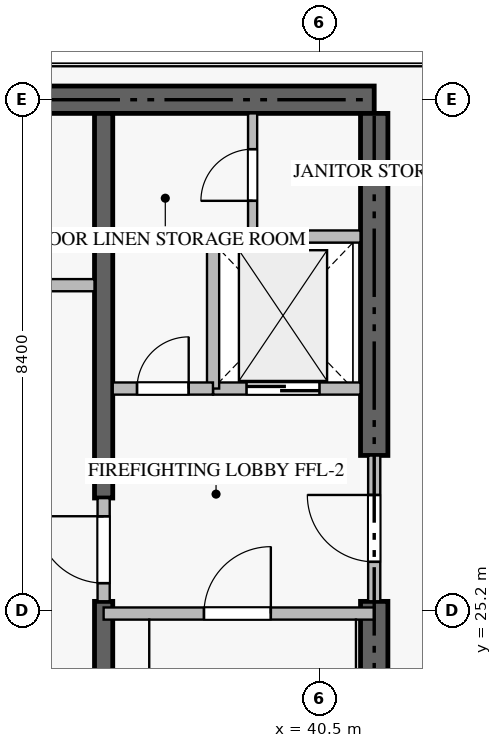
"""IFC4 building model, lengths in metres.
Left out: names, types, materials, properties, quantities, classifications, styles, units other than length and angle.
Written with IfcOpenShell. Run it as: python <this file> out.ifc"""

import sys

from ifc_helpers import new_model, si_unit, direction, frame, frame_2d, origin, place, context, subcontext, project, spatial, rectangle, extrude, source, transform, mapped, element, fill, save


model = new_model("IFC4")
c1 = context("Model", 3, precision=1e-05, world=origin(), true_north=direction((0.0, 1.0)))
c2 = subcontext(c1, "Body", "Model", "MODEL_VIEW")
j1 = project(units=[si_unit("LENGTHUNIT", "METRE"), si_unit("PLANEANGLEUNIT", "RADIAN")], contexts=[c1])
p1 = place(None, origin())
s1 = spatial("IfcSite", under=j1, at=p1, CompositionType="ELEMENT")
p2 = place(p1, origin())
s2 = spatial("IfcBuilding", under=s1, at=p2, CompositionType="ELEMENT")
p3 = place(p2, frame((0.0, 0.0, -3.6)))
s3 = spatial("IfcBuildingStorey", under=s2, at=p3, CompositionType="ELEMENT", Elevation=-3.6)
p4 = place(p3, frame((41.4, 33.6, -0.36), z_axis=(0.0, 0.0, 1.0), x_axis=(-1.0, 0.0, 0.0)))
e1 = element("IfcWall", 1, at=p4, inside=s3, PredefinedType="SHEAR", context=c2, shape_type="SweptSolid", body=[
    extrude(rectangle(XDim=18.0, YDim=0.45, at=frame_2d((9.0, 0.0))), origin(), (0.0, 0.0, 1.0), 3.578),
])
p5 = place(p3, frame((41.4, 17.025, -0.36), z_axis=(0.0, 0.0, 1.0), x_axis=(0.0, 1.0, 0.0)))
e2 = element("IfcWall", 2, at=p5, inside=s3, PredefinedType="SHEAR", context=c2, shape_type="SweptSolid", body=[
    extrude(rectangle(XDim=8.325, YDim=0.45, at=frame_2d((4.163, 0.0))), origin(), (0.0, 0.0, 1.0), 3.578),
])
p6 = place(p3, frame((41.4, 27.75, -0.36), z_axis=(0.0, 0.0, 1.0), x_axis=(0.0, 1.0, 0.0)))
e3 = element("IfcWall", 3, at=p6, inside=s3, PredefinedType="SHEAR", context=c2, shape_type="SweptSolid", body=[
    extrude(rectangle(XDim=5.625, YDim=0.45, at=frame_2d((2.812, 0.0))), origin(), (0.0, 0.0, 1.0), 3.578),
])
p7 = place(p3, frame((36.95, 17.025, -0.36), z_axis=(0.0, 0.0, 1.0), x_axis=(0.0, 1.0, 0.0)))
e4 = element("IfcWall", 4, at=p7, inside=s3, PredefinedType="SHEAR", context=c2, shape_type="SweptSolid", body=[
    extrude(rectangle(XDim=8.325, YDim=0.3, at=frame_2d((4.163, 0.0))), origin(), (0.0, 0.0, 1.0), 3.578),
])
p8 = place(p3, frame((36.95, 27.05, -0.36), z_axis=(0.0, 0.0, 1.0), x_axis=(0.0, 1.0, 0.0)))
e5 = element("IfcWall", 5, at=p8, inside=s3, PredefinedType="SHEAR", context=c2, shape_type="SweptSolid", body=[
    extrude(rectangle(XDim=6.325, YDim=0.3, at=frame_2d((3.163, 0.0))), origin(), (0.0, 0.0, 1.0), 3.578),
])
p9 = place(p3, frame((36.95, 25.15, 0.0), z_axis=(0.0, 0.0, 1.0), x_axis=(1.0, 0.0, 0.0)))
e6 = element("IfcWall", 6, at=p9, inside=s3, PredefinedType="STANDARD", context=c2, shape_type="SweptSolid", body=[
    extrude(rectangle(XDim=4.45, YDim=0.2, at=frame_2d((2.225, 0.0))), origin(), (0.0, 0.0, 1.0), 3.22),
])
p10 = place(p9, frame((1.65, 0.0, 0.0)))
e7 = element("IfcOpeningElement", 7, at=p10, cuts=e6, PredefinedType="OPENING", context=c2, shape_type="SweptSolid", body=[
    extrude(rectangle(XDim=1.1, YDim=2.15, at=frame_2d((0.55, 1.075))), frame((0.0, 0.11, 0.0), z_axis=(0.0, -1.0, 0.0), x_axis=(1.0, 0.0, 0.0)), (0.0, 0.0, 1.0), 0.22),
])
p11 = place(p3, frame((38.75, 28.85, 0.0), z_axis=(0.0, 0.0, 1.0), x_axis=(1.0, 0.0, 0.0)))
e8 = element("IfcWall", 8, at=p11, inside=s3, PredefinedType="STANDARD", context=c2, shape_type="SweptSolid", body=[
    extrude(rectangle(XDim=2.425, YDim=0.2, at=frame_2d((1.212, 0.0))), origin(), (0.0, 0.0, 1.0), 3.22),
])
p12 = place(p11, frame((0.55, 0.0, 0.0)))
e9 = element("IfcOpeningElement", 9, at=p12, cuts=e8, PredefinedType="OPENING", context=c2, shape_type="SweptSolid", body=[
    extrude(rectangle(XDim=1.2, YDim=2.2, at=frame_2d((0.6, 1.1))), frame((0.0, 0.11, 0.0), z_axis=(0.0, -1.0, 0.0), x_axis=(1.0, 0.0, 0.0)), (0.0, 0.0, 1.0), 0.22),
])
p13 = place(p3, frame((38.75, 28.85, 0.0), z_axis=(0.0, 0.0, 1.0), x_axis=(0.0, 1.0, 0.0)))
e10 = element("IfcWall", 10, at=p13, inside=s3, PredefinedType="STANDARD", context=c2, shape_type="SweptSolid", body=[
    extrude(rectangle(XDim=2.5, YDim=0.2, at=frame_2d((1.25, 0.0))), origin(), (0.0, 0.0, 1.0), 3.22),
])
p14 = place(p3, frame((38.75, 31.35, 0.0), z_axis=(0.0, 0.0, 1.0), x_axis=(1.0, 0.0, 0.0)))
e11 = element("IfcWall", 11, at=p14, inside=s3, PredefinedType="STANDARD", context=c2, shape_type="SweptSolid", body=[
    extrude(rectangle(XDim=2.425, YDim=0.2, at=frame_2d((1.212, 0.0))), origin(), (0.0, 0.0, 1.0), 3.22),
])
p15 = place(p3, frame((37.1, 28.85, 0.0), z_axis=(0.0, 0.0, 1.0), x_axis=(1.0, 0.0, 0.0)))
e12 = element("IfcWall", 12, at=p15, inside=s3, PredefinedType="STANDARD", context=c2, shape_type="SweptSolid", body=[
    extrude(rectangle(XDim=1.648, YDim=0.2, at=frame_2d((0.824, 0.0))), origin(), (0.0, 0.0, 1.0), 3.22),
])
p16 = place(p15, frame((0.399, 0.0, 0.0)))
e13 = element("IfcOpeningElement", 13, at=p16, cuts=e12, PredefinedType="OPENING", context=c2, shape_type="SweptSolid", body=[
    extrude(rectangle(XDim=0.85, YDim=2.1, at=frame_2d((0.425, 1.05))), frame((0.0, 0.11, 0.0), z_axis=(0.0, -1.0, 0.0), x_axis=(1.0, 0.0, 0.0)), (0.0, 0.0, 1.0), 0.22),
])
p17 = place(p3, frame((41.4, 25.352, 0.0), z_axis=(0.0, 0.0, 1.0), x_axis=(0.0, 1.0, 0.0)))
e14 = element("IfcWall", 14, at=p17, inside=s3, PredefinedType="STANDARD", context=c2, shape_type="SweptSolid", body=[
    extrude(rectangle(XDim=2.396, YDim=0.2, at=frame_2d((1.198, 0.0))), origin(), (0.0, 0.0, 1.0), 3.22),
])
p18 = place(p17, frame((0.648, 0.0, 0.0)))
e15 = element("IfcOpeningElement", 15, at=p18, cuts=e14, PredefinedType="OPENING", context=c2, shape_type="SweptSolid", body=[
    extrude(rectangle(XDim=1.1, YDim=2.15, at=frame_2d((0.55, 1.075))), frame((0.0, 0.11, 0.0), z_axis=(0.0, -1.0, 0.0), x_axis=(1.0, 0.0, 0.0)), (0.0, 0.0, 1.0), 0.22),
])
p19 = place(p3, frame((36.95, 25.352, 0.0), z_axis=(0.0, 0.0, 1.0), x_axis=(0.0, 1.0, 0.0)))
e16 = element("IfcWall", 16, at=p19, inside=s3, PredefinedType="STANDARD", context=c2, shape_type="SweptSolid", body=[
    extrude(rectangle(XDim=1.696, YDim=0.2, at=frame_2d((0.848, 0.0))), origin(), (0.0, 0.0, 1.0), 3.22),
])
p20 = place(p19, frame((0.298, 0.0, 0.0)))
e17 = element("IfcOpeningElement", 17, at=p20, cuts=e16, PredefinedType="OPENING", context=c2, shape_type="SweptSolid", body=[
    extrude(rectangle(XDim=1.1, YDim=2.15, at=frame_2d((0.55, 1.075))), frame((0.0, 0.11, 0.0), z_axis=(0.0, -1.0, 0.0), x_axis=(1.0, 0.0, 0.0)), (0.0, 0.0, 1.0), 0.22),
])
p21 = place(p3, frame((28.0, 30.55, 0.0), z_axis=(0.0, 0.0, 1.0), x_axis=(1.0, 0.0, 0.0)))
e18 = element("IfcWall", 18, at=p21, inside=s3, PredefinedType="STANDARD", context=c2, shape_type="SweptSolid", body=[
    extrude(rectangle(XDim=8.8, YDim=0.2, at=frame_2d((4.4, 0.0))), origin(), (0.0, 0.0, 1.0), 3.22),
])
p22 = place(p3, frame((39.4, 31.35, 0.0), z_axis=(0.0, 0.0, 1.0), x_axis=(0.0, 1.0, 0.0)))
e19 = element("IfcWall", 19, at=p22, inside=s3, PredefinedType="PARTITIONING", context=c2, shape_type="SweptSolid", body=[
    extrude(rectangle(XDim=2.025, YDim=0.15, at=frame_2d((1.012, 0.0))), origin(), (0.0, 0.0, 1.0), 3.22),
])
p23 = place(p22, frame((0.587, 0.0, 0.0)))
e20 = element("IfcOpeningElement", 20, at=p23, cuts=e19, PredefinedType="OPENING", context=c2, shape_type="SweptSolid", body=[
    extrude(rectangle(XDim=0.85, YDim=2.1, at=frame_2d((0.425, 1.05))), frame((0.0, 0.085, 0.0), z_axis=(0.0, -1.0, 0.0), x_axis=(1.0, 0.0, 0.0)), (0.0, 0.0, 1.0), 0.17),
])
m1 = source(origin(), c2, "Body", "SweptSolid", [
    extrude(rectangle(XDim=1.1, YDim=2.15, at=frame_2d((0.55, 1.075))), frame((0.0, 0.025, 0.0), z_axis=(0.0, -1.0, 0.0), x_axis=(1.0, 0.0, 0.0)), (0.0, 0.0, 1.0), 0.05),
])
p24 = place(p10, origin())
e21 = element("IfcDoor", 21, at=p24, inside=s3, OperationType="SINGLE_SWING_RIGHT", PredefinedType="DOOR", context=c2, shape_type="MappedRepresentation", body=[
    mapped(m1, transform((0.0, 0.0, 0.0), scale=1.0)),
])
fill(e7, e21)
m2 = source(origin(), c2, "Body", "SweptSolid", [
    extrude(rectangle(XDim=1.2, YDim=2.2, at=frame_2d((0.6, 1.1))), frame((0.0, 0.025, 0.0), z_axis=(0.0, -1.0, 0.0), x_axis=(1.0, 0.0, 0.0)), (0.0, 0.0, 1.0), 0.05),
])
p25 = place(p12, origin())
e22 = element("IfcDoor", 22, at=p25, inside=s3, OperationType="DOUBLE_DOOR_SLIDING", PredefinedType="DOOR", context=c2, shape_type="MappedRepresentation", body=[
    mapped(m2, transform((0.0, 0.0, 0.0), scale=1.0)),
])
fill(e9, e22)
m3 = source(origin(), c2, "Body", "SweptSolid", [
    extrude(rectangle(XDim=0.85, YDim=2.1, at=frame_2d((0.425, 1.05))), frame((0.0, 0.025, 0.0), z_axis=(0.0, -1.0, 0.0), x_axis=(1.0, 0.0, 0.0)), (0.0, 0.0, 1.0), 0.05),
])
p26 = place(p16, origin())
e23 = element("IfcDoor", 23, at=p26, inside=s3, OperationType="SINGLE_SWING_RIGHT", PredefinedType="DOOR", context=c2, shape_type="MappedRepresentation", body=[
    mapped(m3, transform((0.0, 0.0, 0.0), scale=1.0)),
])
fill(e13, e23)
p27 = place(p18, origin())
e24 = element("IfcDoor", 24, at=p27, inside=s3, OperationType="SINGLE_SWING_RIGHT", PredefinedType="DOOR", context=c2, shape_type="MappedRepresentation", body=[
    mapped(m1, transform((0.0, 0.0, 0.0), scale=1.0)),
])
fill(e15, e24)
p28 = place(p20, origin())
e25 = element("IfcDoor", 25, at=p28, inside=s3, OperationType="SINGLE_SWING_RIGHT", PredefinedType="DOOR", context=c2, shape_type="MappedRepresentation", body=[
    mapped(m1, transform((0.0, 0.0, 0.0), scale=1.0)),
])
fill(e17, e25)
p29 = place(p23, origin())
e26 = element("IfcDoor", 26, at=p29, inside=s3, OperationType="SINGLE_SWING_LEFT", PredefinedType="DOOR", context=c2, shape_type="MappedRepresentation", body=[
    mapped(m3, transform((0.0, 0.0, 0.0), scale=1.0)),
])
fill(e20, e26)
save(model, sys.argv[1])
